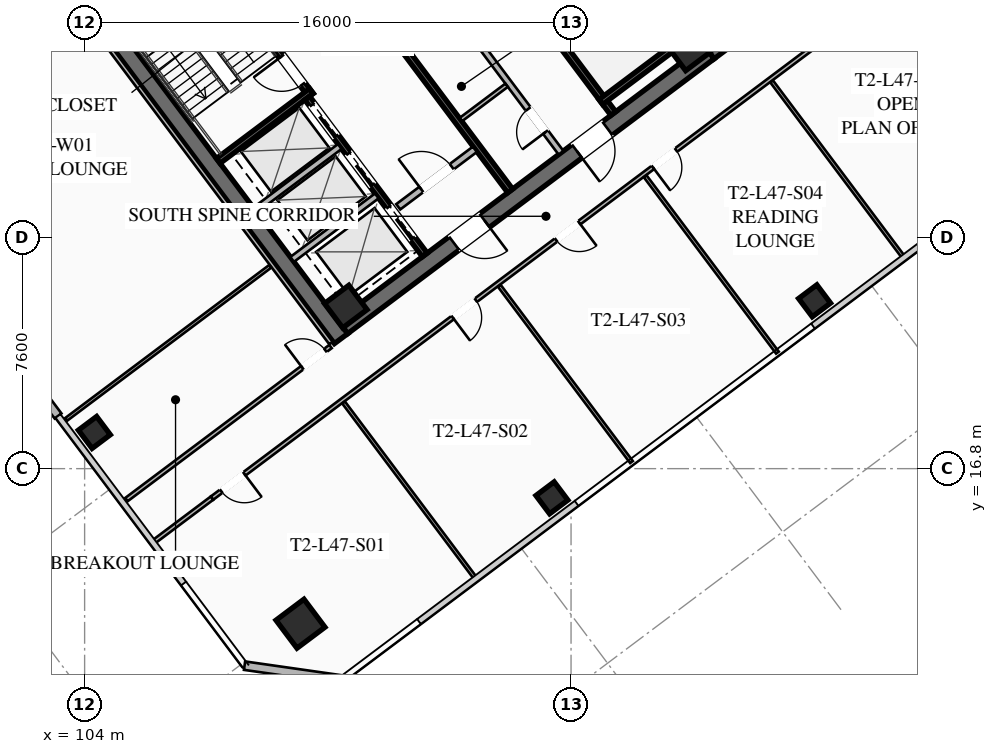
"""IFC4 building model, lengths in metres.
Left out: names, types, materials, properties, quantities, classifications, styles, units other than length and angle.
Written with IfcOpenShell. Run it as: python <this file> out.ifc"""

import sys

from ifc_helpers import new_model, si_unit, direction, frame, frame_2d, origin, origin_2d, place, context, subcontext, project, spatial, rectangle, hollow_rectangle, extrude, element, fill, save


model = new_model("IFC4")
c1 = context("Model", 3, precision=1e-05, world=origin(), true_north=direction((0.0, 1.0)))
c2 = subcontext(c1, "Body", "Model", "MODEL_VIEW")
j1 = project(units=[si_unit("LENGTHUNIT", "METRE"), si_unit("PLANEANGLEUNIT", "RADIAN")], contexts=[c1])
p1 = place(None, origin())
s1 = spatial("IfcSite", under=j1, at=p1, CompositionType="ELEMENT")
p2 = place(p1, origin())
s2 = spatial("IfcBuilding", under=s1, at=p2, CompositionType="ELEMENT")
p3 = place(p2, frame((0.0, 0.0, 174.75)))
s3 = spatial("IfcBuildingStorey", under=s2, at=p3, CompositionType="ELEMENT", Elevation=174.75)
for number, where, z_axis, x_axis in (
    (1, (112.436, 21.077, 0.0), (0.0, 0.0, 1.0), (-0.6, 0.8, 0.0)),
    (2, (115.564, 42.923, 0.0), (0.0, 0.0, 1.0), (0.6, -0.8, 0.0)),
):
    element("IfcWall", number, at=place(p3, frame(where, z_axis=z_axis, x_axis=x_axis)), inside=s3, PredefinedType="SHEAR", context=c2, shape_type="SweptSolid", body=[
        extrude(rectangle(XDim=15.6, YDim=0.55, at=frame_2d((7.8, 0.0))), origin(), (0.0, 0.0, 1.0), 3.55),
    ])
p4 = place(p3, frame((124.539, 30.498, 0.0), z_axis=(0.0, 0.0, 1.0), x_axis=(-0.799998054672, -0.600002593761, 0.0)))
e3 = element("IfcWall", 3, at=p4, inside=s3, PredefinedType="SHEAR", context=c2, shape_type="SweptSolid", body=[
    extrude(rectangle(XDim=15.06, YDim=0.55, at=frame_2d((7.53, 0.0))), origin(), (0.0, 0.0, 1.0), 3.55),
])
p5 = place(p4, frame((9.23, 0.0, 0.0)))
e4 = element("IfcOpeningElement", 4, at=p5, cuts=e3, PredefinedType="OPENING", context=c2, shape_type="SweptSolid", body=[
    extrude(rectangle(XDim=1.25, YDim=2.25, at=frame_2d((0.625, 1.125))), frame((0.0, 0.285, 0.0), z_axis=(0.0, -1.0, 0.0), x_axis=(1.0, 0.0, 0.0)), (0.0, 0.0, 1.0), 0.57),
])
p6 = place(p4, frame((4.18, 0.0, 0.0)))
e5 = element("IfcOpeningElement", 5, at=p6, cuts=e3, PredefinedType="OPENING", context=c2, shape_type="SweptSolid", body=[
    extrude(rectangle(XDim=1.25, YDim=2.25, at=frame_2d((0.625, 1.125))), frame((0.0, 0.285, 0.0), z_axis=(0.0, -1.0, 0.0), x_axis=(1.0, 0.0, 0.0)), (0.0, 0.0, 1.0), 0.57),
])
for number, where, z_axis, x_axis in (
    (6, (112.59, 22.13, 0.0), (0.0, 0.0, 1.0), (0.8, 0.6, 0.0)),
    (7, (123.87, 30.59, 0.0), (0.0, 0.0, 1.0), (0.8, 0.6, 0.0)),
):
    element("IfcColumn", number, at=place(p3, frame(where, z_axis=z_axis, x_axis=x_axis)), inside=s3, PredefinedType="COLUMN", context=c2, shape_type="SweptSolid", body=[
        extrude(hollow_rectangle(XDim=1.0, YDim=1.0, WallThickness=0.04, at=origin_2d()), origin(), (0.0, 0.0, 1.0), 3.37),
    ])
p7 = place(p3, frame((111.1, 11.7, 0.0), z_axis=(0.0, 0.0, 1.0), x_axis=(0.799999996291, 0.600000004945, 0.0)))
e8 = element("IfcColumn", 8, at=p7, inside=s3, PredefinedType="COLUMN", context=c2, shape_type="SweptSolid", body=[
    extrude(hollow_rectangle(XDim=1.15, YDim=1.15, WallThickness=0.045, at=origin_2d()), origin(), (0.0, 0.0, 1.0), 3.37),
])
for number, where, z_axis, x_axis in (
    (9, (119.37, 15.84, 0.0), (0.0, 0.0, 1.0), (0.8, 0.6, 0.0)),
    (10, (128.01, 22.32, 0.0), (0.0, 0.0, 1.0), (0.8, 0.6, 0.0)),
    (11, (104.32, 17.99, 0.0), (0.0, 0.0, 1.0), (0.8, 0.6, 0.0)),
):
    element("IfcColumn", number, at=place(p3, frame(where, z_axis=z_axis, x_axis=x_axis)), inside=s3, PredefinedType="COLUMN", context=c2, shape_type="SweptSolid", body=[
        extrude(hollow_rectangle(XDim=0.75, YDim=0.75, WallThickness=0.032, at=origin_2d()), origin(), (0.0, 0.0, 1.0), 3.37),
    ])
p8 = place(p3, frame((103.126, 18.532, 0.0), z_axis=(0.0, 0.0, 1.0), x_axis=(-0.600004595526, 0.799996553335, 0.0)))
e12 = element("IfcWall", 12, at=p8, inside=s3, PredefinedType="SOLIDWALL", context=c2, shape_type="SweptSolid", body=[
    extrude(rectangle(XDim=8.5, YDim=0.28, at=frame_2d((4.25, 0.0))), origin(), (0.0, 0.0, 1.0), 3.37),
])
p9 = place(p8, frame((3.6, 0.0, 0.0)))
e13 = element("IfcOpeningElement", 13, at=p9, cuts=e12, PredefinedType="OPENING", context=c2, shape_type="SweptSolid", body=[
    extrude(rectangle(XDim=1.3, YDim=2.15, at=frame_2d((0.65, 1.075))), frame((0.0, 0.15, 0.0), z_axis=(0.0, -1.0, 0.0), x_axis=(1.0, 0.0, 0.0)), (0.0, 0.0, 1.0), 0.3),
])
p10 = place(p8, frame((1.46, 0.0, 0.85)))
e14 = element("IfcOpeningElement", 14, at=p10, cuts=e12, PredefinedType="OPENING", context=c2, shape_type="SweptSolid", body=[
    extrude(rectangle(XDim=1.8, YDim=1.92, at=frame_2d((0.9, 0.96))), frame((0.0, 0.15, 0.0), z_axis=(0.0, -1.0, 0.0), x_axis=(1.0, 0.0, 0.0)), (0.0, 0.0, 1.0), 0.3),
])
p11 = place(p3, frame((112.48, 9.86, 0.0), z_axis=(0.0, 0.0, 1.0), x_axis=(-0.989950994782, 0.141410847992, 0.0)))
e15 = element("IfcWall", 15, at=p11, inside=s3, PredefinedType="SOLIDWALL", context=c2, shape_type="SweptSolid", body=[
    extrude(rectangle(XDim=3.253, YDim=0.28, at=frame_2d((1.626, 0.0))), origin(), (0.0, 0.0, 1.0), 3.37),
])
p12 = place(p3, frame((111.44, 29.08, 0.0), z_axis=(0.0, 0.0, 1.0), x_axis=(-0.59999029481, 0.8000072788, 0.0)))
e16 = element("IfcWall", 16, at=p12, inside=s3, PredefinedType="SHEAR", context=c2, shape_type="SweptSolid", body=[
    extrude(rectangle(XDim=8.05, YDim=0.2, at=frame_2d((4.025, 0.0))), origin(), (0.0, 0.0, 1.0), 3.37),
])
p13 = place(p12, frame((0.45, 0.0, 0.0)))
e17 = element("IfcOpeningElement", 17, at=p13, cuts=e16, PredefinedType="OPENING", context=c2, shape_type="SweptSolid", body=[
    extrude(rectangle(XDim=1.15, YDim=2.2, at=frame_2d((0.575, 1.1))), frame((0.0, 0.11, 0.0), z_axis=(0.0, -1.0, 0.0), x_axis=(1.0, 0.0, 0.0)), (0.0, 0.0, 1.0), 0.22),
])
p14 = place(p3, frame((108.396, 26.922, 0.0), z_axis=(0.0, 0.0, 1.0), x_axis=(0.800015298837, 0.599979601008, 0.0)))
e18 = element("IfcWall", 18, at=p14, inside=s3, PredefinedType="SHEAR", context=c2, shape_type="SweptSolid", body=[
    extrude(rectangle(XDim=3.83, YDim=0.2, at=frame_2d((1.915, 0.0))), origin(), (0.0, 0.0, 1.0), 3.37),
])
p15 = place(p3, frame((116.56, 34.92, 0.0), z_axis=(0.0, 0.0, 1.0), x_axis=(0.59999029481, -0.8000072788, 0.0)))
e19 = element("IfcWall", 19, at=p15, inside=s3, PredefinedType="SHEAR", context=c2, shape_type="SweptSolid", body=[
    extrude(rectangle(XDim=8.05, YDim=0.2, at=frame_2d((4.025, 0.0))), origin(), (0.0, 0.0, 1.0), 3.37),
])
p16 = place(p15, frame((0.45, 0.0, 0.0)))
e20 = element("IfcOpeningElement", 20, at=p16, cuts=e19, PredefinedType="OPENING", context=c2, shape_type="SweptSolid", body=[
    extrude(rectangle(XDim=1.15, YDim=2.2, at=frame_2d((0.575, 1.1))), frame((0.0, 0.11, 0.0), z_axis=(0.0, -1.0, 0.0), x_axis=(1.0, 0.0, 0.0)), (0.0, 0.0, 1.0), 0.22),
])
p17 = place(p3, frame((120.98, 28.86, 0.0), z_axis=(0.0, 0.0, 1.0), x_axis=(0.800015298837, 0.599979601008, 0.0)))
e21 = element("IfcWall", 21, at=p17, inside=s3, PredefinedType="SHEAR", context=c2, shape_type="SweptSolid", body=[
    extrude(rectangle(XDim=3.83, YDim=0.2, at=frame_2d((1.915, 0.0))), origin(), (0.0, 0.0, 1.0), 3.37),
])
p18 = place(p3, frame((117.998, 25.936, 0.0), z_axis=(0.0, 0.0, 1.0), x_axis=(-0.600002693989, 0.799997979501, 0.0)))
e22 = element("IfcWall", 22, at=p18, inside=s3, PredefinedType="SHEAR", context=c2, shape_type="SweptSolid", body=[
    extrude(rectangle(XDim=14.5, YDim=0.2, at=frame_2d((7.25, 0.0))), origin(), (0.0, 0.0, 1.0), 3.37),
])
p19 = place(p3, frame((114.316, 25.412, 0.0), z_axis=(0.0, 0.0, 1.0), x_axis=(0.800018601094, 0.59997519774, 0.0)))
e23 = element("IfcWall", 23, at=p19, inside=s3, PredefinedType="SOLIDWALL", context=c2, shape_type="SweptSolid", body=[
    extrude(rectangle(XDim=3.15, YDim=0.22, at=frame_2d((1.575, 0.0))), origin(), (0.0, 0.0, 1.0), 2.723),
])
p20 = place(p19, frame((0.95, 0.0, 0.0)))
e24 = element("IfcOpeningElement", 24, at=p20, cuts=e23, PredefinedType="OPENING", context=c2, shape_type="SweptSolid", body=[
    extrude(rectangle(XDim=1.25, YDim=2.25, at=frame_2d((0.625, 1.125))), frame((0.0, 0.12, 0.0), z_axis=(0.0, -1.0, 0.0), x_axis=(1.0, 0.0, 0.0)), (0.0, 0.0, 1.0), 0.24),
])
p21 = place(p3, frame((115.19, 23.83, 0.0), z_axis=(0.0, 0.0, 1.0), x_axis=(-0.599993943644, 0.800004542231, 0.0)))
e25 = element("IfcWall", 25, at=p21, inside=s3, PredefinedType="SHEAR", context=c2, shape_type="SweptSolid", body=[
    extrude(rectangle(XDim=6.45, YDim=0.2, at=frame_2d((3.225, 0.0))), origin(), (0.0, 0.0, 1.0), 3.37),
])
p22 = place(p21, frame((4.875, 0.0, 0.0)))
e26 = element("IfcOpeningElement", 26, at=p22, cuts=e25, PredefinedType="OPENING", context=c2, shape_type="SweptSolid", body=[
    extrude(rectangle(XDim=1.3, YDim=2.25, at=frame_2d((0.65, 1.125))), frame((0.0, 0.11, 0.0), z_axis=(0.0, -1.0, 0.0), x_axis=(1.0, 0.0, 0.0)), (0.0, 0.0, 1.0), 0.22),
])
p23 = place(p21, frame((2.875, 0.0, 0.0)))
e27 = element("IfcOpeningElement", 27, at=p23, cuts=e25, PredefinedType="OPENING", context=c2, shape_type="SweptSolid", body=[
    extrude(rectangle(XDim=1.3, YDim=2.25, at=frame_2d((0.65, 1.125))), frame((0.0, 0.11, 0.0), z_axis=(0.0, -1.0, 0.0), x_axis=(1.0, 0.0, 0.0)), (0.0, 0.0, 1.0), 0.22),
])
p24 = place(p21, frame((0.675, 0.0, 0.0)))
e28 = element("IfcOpeningElement", 28, at=p24, cuts=e25, PredefinedType="OPENING", context=c2, shape_type="SweptSolid", body=[
    extrude(rectangle(XDim=1.3, YDim=2.25, at=frame_2d((0.65, 1.125))), frame((0.0, 0.11, 0.0), z_axis=(0.0, -1.0, 0.0), x_axis=(1.0, 0.0, 0.0)), (0.0, 0.0, 1.0), 0.22),
])
for number, where, z_axis, x_axis in (
    (29, (110.826, 23.682, 0.0), (0.0, 0.0, 1.0), (0.8, 0.6, 0.0)),
    (30, (109.608, 25.306, 0.0), (0.0, 0.0, 1.0), (0.8, 0.6, 0.0)),
):
    element("IfcWall", number, at=place(p3, frame(where, z_axis=z_axis, x_axis=x_axis)), inside=s3, PredefinedType="SOLIDWALL", context=c2, shape_type="SweptSolid", body=[
        extrude(rectangle(XDim=3.48, YDim=0.2, at=frame_2d((1.74, 0.0))), origin(), (0.0, 0.0, 1.0), 3.37),
    ])
p25 = place(p3, frame((119.67, 27.19, 0.0), z_axis=(0.0, 0.0, 1.0), x_axis=(-0.599988677396, 0.800008491828, 0.0)))
e31 = element("IfcWall", 31, at=p25, inside=s3, PredefinedType="SOLIDWALL", context=c2, shape_type="SweptSolid", body=[
    extrude(rectangle(XDim=6.9, YDim=0.2, at=frame_2d((3.45, 0.0))), origin(), (0.0, 0.0, 1.0), 2.723),
])
p26 = place(p25, frame((0.85, 0.0, 0.0)))
e32 = element("IfcOpeningElement", 32, at=p26, cuts=e31, PredefinedType="OPENING", context=c2, shape_type="SweptSolid", body=[
    extrude(rectangle(XDim=0.95, YDim=2.05, at=frame_2d((0.475, 1.025))), frame((0.0, 0.11, 0.0), z_axis=(0.0, -1.0, 0.0), x_axis=(1.0, 0.0, 0.0)), (0.0, 0.0, 1.0), 0.22),
])
p27 = place(p25, frame((4.8, 0.0, 0.0)))
e33 = element("IfcOpeningElement", 33, at=p27, cuts=e31, PredefinedType="OPENING", context=c2, shape_type="SweptSolid", body=[
    extrude(rectangle(XDim=1.05, YDim=2.2, at=frame_2d((0.525, 1.1))), frame((0.0, 0.11, 0.0), z_axis=(0.0, -1.0, 0.0), x_axis=(1.0, 0.0, 0.0)), (0.0, 0.0, 1.0), 0.22),
])
p28 = place(p3, frame((116.376, 28.282, 0.0), z_axis=(0.0, 0.0, 1.0), x_axis=(0.8, 0.6, 0.0)))
e34 = element("IfcWall", 34, at=p28, inside=s3, PredefinedType="PARTITIONING", context=c2, shape_type="SweptSolid", body=[
    extrude(rectangle(XDim=1.88, YDim=0.135, at=frame_2d((0.94, 0.0))), origin(), (0.0, 0.0, 1.0), 2.723),
])
p29 = place(p3, frame((131.15, 33.05, 0.0), z_axis=(0.0, 0.0, 1.0), x_axis=(-0.8, -0.6, 0.0)))
e35 = element("IfcWall", 35, at=p29, inside=s3, PredefinedType="PARTITIONING", context=c2, shape_type="SweptSolid", body=[
    extrude(rectangle(XDim=28.7, YDim=0.135, at=frame_2d((14.35, 0.0))), origin(), (0.0, 0.0, 1.0), 2.723),
])
p30 = place(p29, frame((27.37, 0.0, 0.0)))
e36 = element("IfcOpeningElement", 36, at=p30, cuts=e35, PredefinedType="OPENING", context=c2, shape_type="SweptSolid", body=[
    extrude(rectangle(XDim=0.95, YDim=2.05, at=frame_2d((0.475, 1.025))), frame((0.0, 0.077, 0.0), z_axis=(0.0, -1.0, 0.0), x_axis=(1.0, 0.0, 0.0)), (0.0, 0.0, 1.0), 0.155),
])
p31 = place(p29, frame((17.851, 0.0, 0.0)))
e37 = element("IfcOpeningElement", 37, at=p31, cuts=e35, PredefinedType="OPENING", context=c2, shape_type="SweptSolid", body=[
    extrude(rectangle(XDim=0.95, YDim=2.05, at=frame_2d((0.475, 1.025))), frame((0.0, 0.077, 0.0), z_axis=(0.0, -1.0, 0.0), x_axis=(1.0, 0.0, 0.0)), (0.0, 0.0, 1.0), 0.155),
])
p32 = place(p29, frame((13.601, 0.0, 0.0)))
e38 = element("IfcOpeningElement", 38, at=p32, cuts=e35, PredefinedType="OPENING", context=c2, shape_type="SweptSolid", body=[
    extrude(rectangle(XDim=0.95, YDim=2.05, at=frame_2d((0.475, 1.025))), frame((0.0, 0.077, 0.0), z_axis=(0.0, -1.0, 0.0), x_axis=(1.0, 0.0, 0.0)), (0.0, 0.0, 1.0), 0.155),
])
p33 = place(p29, frame((9.62, 0.0, 0.0)))
e39 = element("IfcOpeningElement", 39, at=p33, cuts=e35, PredefinedType="OPENING", context=c2, shape_type="SweptSolid", body=[
    extrude(rectangle(XDim=0.95, YDim=2.05, at=frame_2d((0.475, 1.025))), frame((0.0, 0.077, 0.0), z_axis=(0.0, -1.0, 0.0), x_axis=(1.0, 0.0, 0.0)), (0.0, 0.0, 1.0), 0.155),
])
p34 = place(p29, frame((0.38, 0.0, 0.0)))
e40 = element("IfcOpeningElement", 40, at=p34, cuts=e35, PredefinedType="OPENING", context=c2, shape_type="SweptSolid", body=[
    extrude(rectangle(XDim=0.95, YDim=2.05, at=frame_2d((0.475, 1.025))), frame((0.0, 0.077, 0.0), z_axis=(0.0, -1.0, 0.0), x_axis=(1.0, 0.0, 0.0)), (0.0, 0.0, 1.0), 0.155),
])
p35 = place(p3, frame((106.246, 14.372, 0.0), z_axis=(0.0, 0.0, 1.0), x_axis=(0.799975885537, 0.600032151272, 0.0)))
e41 = element("IfcWall", 41, at=p35, inside=s3, PredefinedType="PARTITIONING", context=c2, shape_type="SweptSolid", body=[
    extrude(rectangle(XDim=2.43, YDim=0.135, at=frame_2d((1.215, 0.0))), origin(), (0.0, 0.0, 1.0), 2.723),
])
for number, where, z_axis, x_axis in (
    (42, (116.868, 13.176, 0.0), (0.0, 0.0, 1.0), (-0.6, 0.8, 0.0)),
    (43, (121.988, 17.016, 0.0), (0.0, 0.0, 1.0), (-0.6, 0.8, 0.0)),
    (44, (126.788, 20.616, 0.0), (0.0, 0.0, 1.0), (-0.6, 0.8, 0.0)),
    (45, (130.948, 23.736, 0.0), (0.0, 0.0, 1.0), (-0.6, 0.8, 0.0)),
):
    element("IfcWall", number, at=place(p3, frame(where, z_axis=z_axis, x_axis=x_axis)), inside=s3, PredefinedType="PARTITIONING", context=c2, shape_type="SweptSolid", body=[
        extrude(rectangle(XDim=7.25, YDim=0.11, at=frame_2d((3.625, 0.0))), origin(), (0.0, 0.0, 1.0), 2.723),
    ])
p36 = place(p3, frame((112.104, 20.928, 0.0), z_axis=(0.0, 0.0, 1.0), x_axis=(-0.599994940075, 0.800003794918, 0.0)))
e46 = element("IfcWall", 46, at=p36, inside=s3, PredefinedType="PARTITIONING", context=c2, shape_type="SweptSolid", body=[
    extrude(rectangle(XDim=15.44, YDim=0.135, at=frame_2d((7.72, 0.0))), origin(), (0.0, 0.0, 1.0), 2.723),
])
p37 = place(p3, frame((105.376, 15.782, 0.0), z_axis=(0.0, 0.0, 1.0), x_axis=(0.8, 0.6, 0.0)))
e47 = element("IfcWall", 47, at=p37, inside=s3, PredefinedType="PARTITIONING", context=c2, shape_type="SweptSolid", body=[
    extrude(rectangle(XDim=8.39, YDim=0.135, at=frame_2d((4.195, 0.0))), origin(), (0.0, 0.0, 1.0), 2.723),
])
p38 = place(p37, frame((7.23, 0.0, 0.0)))
e48 = element("IfcOpeningElement", 48, at=p38, cuts=e47, PredefinedType="OPENING", context=c2, shape_type="SweptSolid", body=[
    extrude(rectangle(XDim=0.95, YDim=2.05, at=frame_2d((0.475, 1.025))), frame((0.0, 0.077, 0.0), z_axis=(0.0, -1.0, 0.0), x_axis=(1.0, 0.0, 0.0)), (0.0, 0.0, 1.0), 0.155),
])
p39 = place(p3, frame((103.396, 18.422, 0.0), z_axis=(0.0, 0.0, 1.0), x_axis=(0.8, 0.6, 0.0)))
e49 = element("IfcWall", 49, at=p39, inside=s3, PredefinedType="PARTITIONING", context=c2, shape_type="SweptSolid", body=[
    extrude(rectangle(XDim=8.39, YDim=0.11, at=frame_2d((4.195, 0.0))), origin(), (0.0, 0.0, 1.0), 2.723),
])
p40 = place(p5, origin())
e50 = element("IfcDoor", 50, at=p40, inside=s3, OperationType="SINGLE_SWING_LEFT", PredefinedType="DOOR", context=c2, shape_type="SweptSolid", body=[
    extrude(rectangle(XDim=1.25, YDim=2.25, at=frame_2d((0.625, 1.125))), frame((0.0, 0.025, 0.0), z_axis=(0.0, -1.0, 0.0), x_axis=(1.0, 0.0, 0.0)), (0.0, 0.0, 1.0), 0.05),
])
fill(e4, e50)
p41 = place(p6, origin())
e51 = element("IfcDoor", 51, at=p41, inside=s3, OperationType="SINGLE_SWING_RIGHT", PredefinedType="DOOR", context=c2, shape_type="SweptSolid", body=[
    extrude(rectangle(XDim=1.25, YDim=2.25, at=frame_2d((0.625, 1.125))), frame((0.0, 0.025, 0.0), z_axis=(0.0, -1.0, 0.0), x_axis=(1.0, 0.0, 0.0)), (0.0, 0.0, 1.0), 0.05),
])
fill(e5, e51)
p42 = place(p13, origin())
e52 = element("IfcDoor", 52, at=p42, inside=s3, OperationType="SINGLE_SWING_RIGHT", PredefinedType="DOOR", context=c2, shape_type="SweptSolid", body=[
    extrude(rectangle(XDim=1.15, YDim=2.2, at=frame_2d((0.575, 1.1))), frame((0.0, 0.025, 0.0), z_axis=(0.0, -1.0, 0.0), x_axis=(1.0, 0.0, 0.0)), (0.0, 0.0, 1.0), 0.05),
])
fill(e17, e52)
p43 = place(p20, origin())
e53 = element("IfcDoor", 53, at=p43, inside=s3, OperationType="SINGLE_SWING_LEFT", PredefinedType="DOOR", context=c2, shape_type="SweptSolid", body=[
    extrude(rectangle(XDim=1.25, YDim=2.25, at=frame_2d((0.625, 1.125))), frame((0.0, 0.025, 0.0), z_axis=(0.0, -1.0, 0.0), x_axis=(1.0, 0.0, 0.0)), (0.0, 0.0, 1.0), 0.05),
])
fill(e24, e53)
p44 = place(p26, origin())
e54 = element("IfcDoor", 54, at=p44, inside=s3, OperationType="SINGLE_SWING_LEFT", PredefinedType="DOOR", context=c2, shape_type="SweptSolid", body=[
    extrude(rectangle(XDim=0.95, YDim=2.05, at=frame_2d((0.475, 1.025))), frame((0.0, 0.025, 0.0), z_axis=(0.0, -1.0, 0.0), x_axis=(1.0, 0.0, 0.0)), (0.0, 0.0, 1.0), 0.05),
])
fill(e32, e54)
p45 = place(p30, origin())
e55 = element("IfcDoor", 55, at=p45, inside=s3, OperationType="SINGLE_SWING_LEFT", PredefinedType="DOOR", context=c2, shape_type="SweptSolid", body=[
    extrude(rectangle(XDim=0.95, YDim=2.05, at=frame_2d((0.475, 1.025))), frame((0.0, 0.025, 0.0), z_axis=(0.0, -1.0, 0.0), x_axis=(1.0, 0.0, 0.0)), (0.0, 0.0, 1.0), 0.05),
])
fill(e36, e55)
p46 = place(p31, origin())
e56 = element("IfcDoor", 56, at=p46, inside=s3, OperationType="SINGLE_SWING_RIGHT", PredefinedType="DOOR", context=c2, shape_type="SweptSolid", body=[
    extrude(rectangle(XDim=0.95, YDim=2.05, at=frame_2d((0.475, 1.025))), frame((0.0, 0.025, 0.0), z_axis=(0.0, -1.0, 0.0), x_axis=(1.0, 0.0, 0.0)), (0.0, 0.0, 1.0), 0.05),
])
fill(e37, e56)
p47 = place(p32, origin())
e57 = element("IfcDoor", 57, at=p47, inside=s3, OperationType="SINGLE_SWING_LEFT", PredefinedType="DOOR", context=c2, shape_type="SweptSolid", body=[
    extrude(rectangle(XDim=0.95, YDim=2.05, at=frame_2d((0.475, 1.025))), frame((0.0, 0.025, 0.0), z_axis=(0.0, -1.0, 0.0), x_axis=(1.0, 0.0, 0.0)), (0.0, 0.0, 1.0), 0.05),
])
fill(e38, e57)
p48 = place(p33, origin())
e58 = element("IfcDoor", 58, at=p48, inside=s3, OperationType="SINGLE_SWING_RIGHT", PredefinedType="DOOR", context=c2, shape_type="SweptSolid", body=[
    extrude(rectangle(XDim=0.95, YDim=2.05, at=frame_2d((0.475, 1.025))), frame((0.0, 0.025, 0.0), z_axis=(0.0, -1.0, 0.0), x_axis=(1.0, 0.0, 0.0)), (0.0, 0.0, 1.0), 0.05),
])
fill(e39, e58)
p49 = place(p38, origin())
e59 = element("IfcDoor", 59, at=p49, inside=s3, OperationType="SINGLE_SWING_LEFT", PredefinedType="DOOR", context=c2, shape_type="SweptSolid", body=[
    extrude(rectangle(XDim=0.95, YDim=2.05, at=frame_2d((0.475, 1.025))), frame((0.0, 0.025, 0.0), z_axis=(0.0, -1.0, 0.0), x_axis=(1.0, 0.0, 0.0)), (0.0, 0.0, 1.0), 0.05),
])
fill(e48, e59)
p50 = place(p22, origin())
e60 = element("IfcDoor", 60, at=p50, inside=s3, OperationType="SLIDING_TO_LEFT", PredefinedType="DOOR", context=c2, shape_type="SweptSolid", body=[
    extrude(rectangle(XDim=1.3, YDim=2.25, at=frame_2d((0.65, 1.125))), frame((0.0, 0.025, 0.0), z_axis=(0.0, -1.0, 0.0), x_axis=(1.0, 0.0, 0.0)), (0.0, 0.0, 1.0), 0.05),
])
fill(e26, e60)
p51 = place(p23, origin())
e61 = element("IfcDoor", 61, at=p51, inside=s3, OperationType="SLIDING_TO_LEFT", PredefinedType="DOOR", context=c2, shape_type="SweptSolid", body=[
    extrude(rectangle(XDim=1.3, YDim=2.25, at=frame_2d((0.65, 1.125))), frame((0.0, 0.025, 0.0), z_axis=(0.0, -1.0, 0.0), x_axis=(1.0, 0.0, 0.0)), (0.0, 0.0, 1.0), 0.05),
])
fill(e27, e61)
p52 = place(p24, origin())
e62 = element("IfcDoor", 62, at=p52, inside=s3, OperationType="SLIDING_TO_LEFT", PredefinedType="DOOR", context=c2, shape_type="SweptSolid", body=[
    extrude(rectangle(XDim=1.3, YDim=2.25, at=frame_2d((0.65, 1.125))), frame((0.0, 0.025, 0.0), z_axis=(0.0, -1.0, 0.0), x_axis=(1.0, 0.0, 0.0)), (0.0, 0.0, 1.0), 0.05),
])
fill(e28, e62)
save(model, sys.argv[1])
